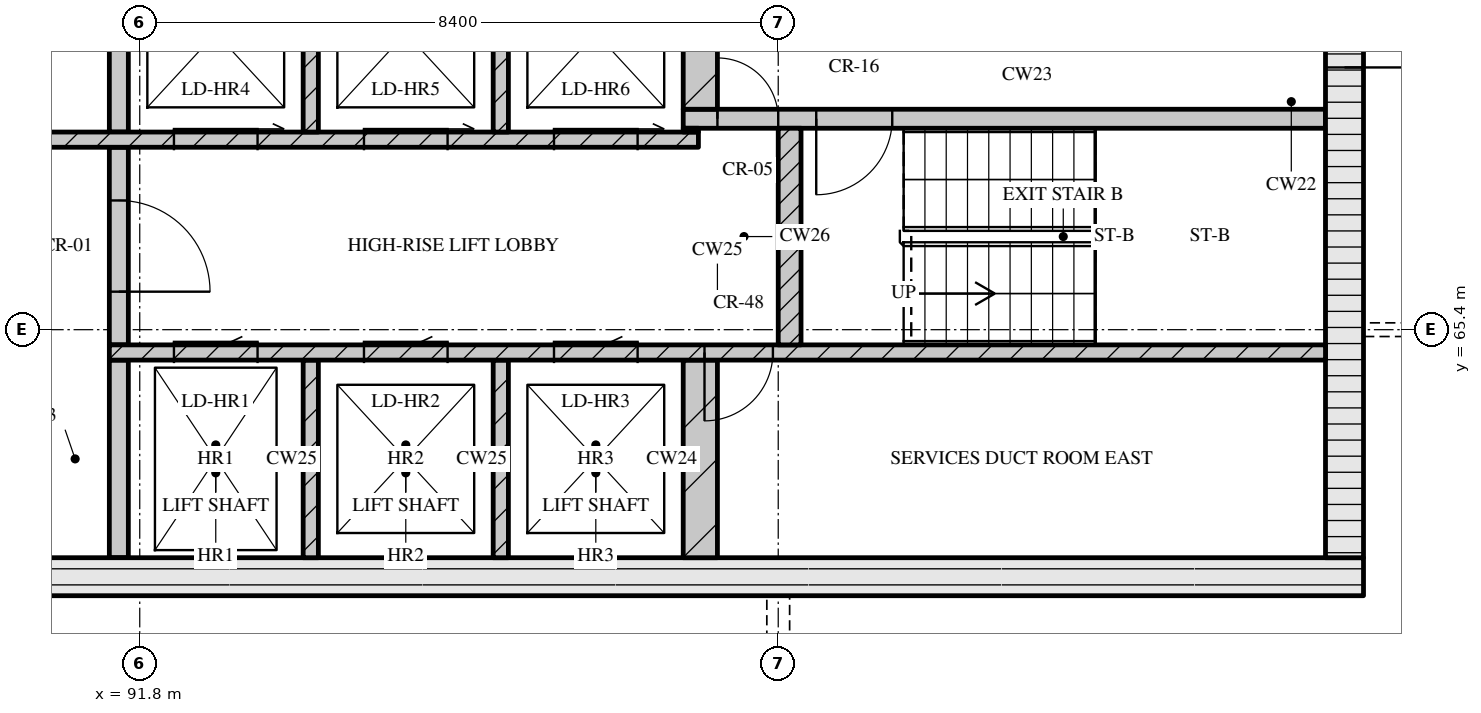
"""IFC4 building model, lengths in metres.
Left out: names, types, materials, properties, quantities, classifications, styles, units other than length and angle.
Written with IfcOpenShell. Run it as: python <this file> out.ifc"""

import sys

from ifc_helpers import new_model, si_unit, direction, frame, frame_2d, origin, place, context, subcontext, project, spatial, rectangle, extrude, element, fill, save


model = new_model("IFC4")
c1 = context("Model", 3, precision=1e-05, world=origin(), true_north=direction((0.0, 1.0)))
c2 = subcontext(c1, "Body", "Model", "MODEL_VIEW")
j1 = project(units=[si_unit("LENGTHUNIT", "METRE"), si_unit("PLANEANGLEUNIT", "RADIAN")], contexts=[c1])
p1 = place(None, origin())
s1 = spatial("IfcSite", under=j1, at=p1, CompositionType="ELEMENT")
p2 = place(p1, origin())
s2 = spatial("IfcBuilding", under=s1, at=p2, CompositionType="ELEMENT")
p3 = place(p2, frame((0.0, 0.0, 306.75)))
s3 = spatial("IfcBuildingStorey", under=s2, at=p3, CompositionType="ELEMENT", Elevation=306.75)
p4 = place(p3, frame((67.3, 62.15, 0.0), z_axis=(0.0, 0.0, 1.0), x_axis=(1.0, 0.0, 0.0)))
e1 = element("IfcWall", 1, at=p4, inside=s3, PredefinedType="SOLIDWALL", context=c2, shape_type="SweptSolid", body=[
    extrude(rectangle(XDim=40.6, YDim=0.5, at=frame_2d((20.3, 0.0))), origin(), (0.0, 0.0, 1.0), 3.3),
])
p5 = place(p4, frame((20.65, 0.0, 0.0)))
e2 = element("IfcOpeningElement", 2, at=p5, cuts=e1, PredefinedType="OPENING", context=c2, shape_type="SweptSolid", body=[
    extrude(rectangle(XDim=1.8, YDim=2.1, at=frame_2d((0.9, 1.05))), frame((0.0, 0.26, 0.0), z_axis=(0.0, -1.0, 0.0), x_axis=(1.0, 0.0, 0.0)), (0.0, 0.0, 1.0), 0.52),
])
p6 = place(p3, frame((107.65, 62.4, 0.0), z_axis=(0.0, 0.0, 1.0), x_axis=(0.0, 1.0, 0.0)))
e3 = element("IfcWall", 3, at=p6, inside=s3, PredefinedType="SOLIDWALL", context=c2, shape_type="SweptSolid", body=[
    extrude(rectangle(XDim=12.0, YDim=0.5, at=frame_2d((6.0, 0.0))), origin(), (0.0, 0.0, 1.0), 3.3),
])
p7 = place(p6, frame((6.45, 0.0, 0.0)))
e4 = element("IfcOpeningElement", 4, at=p7, cuts=e3, PredefinedType="OPENING", context=c2, shape_type="SweptSolid", body=[
    extrude(rectangle(XDim=1.2, YDim=2.1, at=frame_2d((0.6, 1.05))), frame((0.0, 0.26, 0.0), z_axis=(0.0, -1.0, 0.0), x_axis=(1.0, 0.0, 0.0)), (0.0, 0.0, 1.0), 0.52),
])
p8 = place(p3, frame((91.525, 62.4, 0.0), z_axis=(0.0, 0.0, 1.0), x_axis=(0.0, 1.0, 0.0)))
e5 = element("IfcWall", 5, at=p8, inside=s3, PredefinedType="SOLIDWALL", context=c2, shape_type="SweptSolid", body=[
    extrude(rectangle(XDim=2.6, YDim=0.25, at=frame_2d((1.3, 0.0))), origin(), (0.0, 0.0, 1.0), 3.3),
])
for number, where, z_axis, x_axis in (
    (6, (94.05, 62.4, 0.0), (0.0, 0.0, 1.0), (0.0, 1.0, 0.0)),
    (7, (96.55, 62.4, 0.0), (0.0, 0.0, 1.0), (0.0, 1.0, 0.0)),
):
    element("IfcWall", number, at=place(p3, frame(where, z_axis=z_axis, x_axis=x_axis)), inside=s3, PredefinedType="SOLIDWALL", context=c2, shape_type="SweptSolid", body=[
        extrude(rectangle(XDim=2.6, YDim=0.2, at=frame_2d((1.3, 0.0))), origin(), (0.0, 0.0, 1.0), 3.3),
    ])
p9 = place(p3, frame((99.175, 62.4, 0.0), z_axis=(0.0, 0.0, 1.0), x_axis=(0.0, 1.0, 0.0)))
e8 = element("IfcWall", 8, at=p9, inside=s3, PredefinedType="SOLIDWALL", context=c2, shape_type="SweptSolid", body=[
    extrude(rectangle(XDim=2.6, YDim=0.45, at=frame_2d((1.3, 0.0))), origin(), (0.0, 0.0, 1.0), 3.3),
])
p10 = place(p3, frame((91.4, 65.1, 0.0), z_axis=(0.0, 0.0, 1.0), x_axis=(1.0, 0.0, 0.0)))
e9 = element("IfcWall", 9, at=p10, inside=s3, PredefinedType="SOLIDWALL", context=c2, shape_type="SweptSolid", body=[
    extrude(rectangle(XDim=16.0, YDim=0.2, at=frame_2d((8.0, 0.0))), origin(), (0.0, 0.0, 1.0), 3.3),
])
p11 = place(p10, frame((0.85, 0.0, 0.0)))
e10 = element("IfcOpeningElement", 10, at=p11, cuts=e9, PredefinedType="OPENING", context=c2, shape_type="SweptSolid", body=[
    extrude(rectangle(XDim=1.1, YDim=2.1, at=frame_2d((0.55, 1.05))), frame((0.0, 0.11, 0.0), z_axis=(0.0, -1.0, 0.0), x_axis=(1.0, 0.0, 0.0)), (0.0, 0.0, 1.0), 0.22),
])
p12 = place(p10, frame((3.35, 0.0, 0.0)))
e11 = element("IfcOpeningElement", 11, at=p12, cuts=e9, PredefinedType="OPENING", context=c2, shape_type="SweptSolid", body=[
    extrude(rectangle(XDim=1.1, YDim=2.1, at=frame_2d((0.55, 1.05))), frame((0.0, 0.11, 0.0), z_axis=(0.0, -1.0, 0.0), x_axis=(1.0, 0.0, 0.0)), (0.0, 0.0, 1.0), 0.22),
])
p13 = place(p10, frame((5.85, 0.0, 0.0)))
e12 = element("IfcOpeningElement", 12, at=p13, cuts=e9, PredefinedType="OPENING", context=c2, shape_type="SweptSolid", body=[
    extrude(rectangle(XDim=1.1, YDim=2.1, at=frame_2d((0.55, 1.05))), frame((0.0, 0.11, 0.0), z_axis=(0.0, -1.0, 0.0), x_axis=(1.0, 0.0, 0.0)), (0.0, 0.0, 1.0), 0.22),
])
p14 = place(p10, frame((7.83, 0.0, 0.0)))
e13 = element("IfcOpeningElement", 13, at=p14, cuts=e9, PredefinedType="OPENING", context=c2, shape_type="SweptSolid", body=[
    extrude(rectangle(XDim=0.9, YDim=2.1, at=frame_2d((0.45, 1.05))), frame((0.0, 0.11, 0.0), z_axis=(0.0, -1.0, 0.0), x_axis=(1.0, 0.0, 0.0)), (0.0, 0.0, 1.0), 0.22),
])
p15 = place(p3, frame((91.525, 65.2, 0.0), z_axis=(0.0, 0.0, 1.0), x_axis=(0.0, 1.0, 0.0)))
e14 = element("IfcWall", 14, at=p15, inside=s3, PredefinedType="SOLIDWALL", context=c2, shape_type="SweptSolid", body=[
    extrude(rectangle(XDim=2.6, YDim=0.25, at=frame_2d((1.3, 0.0))), origin(), (0.0, 0.0, 1.0), 3.3),
])
p16 = place(p15, frame((0.7, 0.0, 0.0)))
e15 = element("IfcOpeningElement", 15, at=p16, cuts=e14, PredefinedType="OPENING", context=c2, shape_type="SweptSolid", body=[
    extrude(rectangle(XDim=1.2, YDim=2.1, at=frame_2d((0.6, 1.05))), frame((0.0, 0.135, 0.0), z_axis=(0.0, -1.0, 0.0), x_axis=(1.0, 0.0, 0.0)), (0.0, 0.0, 1.0), 0.27),
])
p17 = place(p3, frame((100.35, 65.2, 0.0), z_axis=(0.0, 0.0, 1.0), x_axis=(0.0, 1.0, 0.0)))
e16 = element("IfcWall", 16, at=p17, inside=s3, PredefinedType="SOLIDWALL", context=c2, shape_type="SweptSolid", body=[
    extrude(rectangle(XDim=2.85, YDim=0.3, at=frame_2d((1.425, 0.0))), origin(), (0.0, 0.0, 1.0), 3.3),
])
p18 = place(p3, frame((76.05, 67.9, 0.0), z_axis=(0.0, 0.0, 1.0), x_axis=(1.0, 0.0, 0.0)))
e17 = element("IfcWall", 17, at=p18, inside=s3, PredefinedType="SOLIDWALL", context=c2, shape_type="SweptSolid", body=[
    extrude(rectangle(XDim=23.1, YDim=0.2, at=frame_2d((11.55, 0.0))), origin(), (0.0, 0.0, 1.0), 3.3),
])
p19 = place(p18, frame((1.4, 0.0, 0.0)))
e18 = element("IfcOpeningElement", 18, at=p19, cuts=e17, PredefinedType="OPENING", context=c2, shape_type="SweptSolid", body=[
    extrude(rectangle(XDim=0.9, YDim=2.1, at=frame_2d((0.45, 1.05))), frame((0.0, 0.11, 0.0), z_axis=(0.0, -1.0, 0.0), x_axis=(1.0, 0.0, 0.0)), (0.0, 0.0, 1.0), 0.22),
])
p20 = place(p18, frame((5.11, 0.0, 0.0)))
e19 = element("IfcOpeningElement", 19, at=p20, cuts=e17, PredefinedType="OPENING", context=c2, shape_type="SweptSolid", body=[
    extrude(rectangle(XDim=0.9, YDim=2.1, at=frame_2d((0.45, 1.05))), frame((0.0, 0.11, 0.0), z_axis=(0.0, -1.0, 0.0), x_axis=(1.0, 0.0, 0.0)), (0.0, 0.0, 1.0), 0.22),
])
p21 = place(p18, frame((8.45, 0.0, 0.0)))
e20 = element("IfcOpeningElement", 20, at=p21, cuts=e17, PredefinedType="OPENING", context=c2, shape_type="SweptSolid", body=[
    extrude(rectangle(XDim=0.9, YDim=2.1, at=frame_2d((0.45, 1.05))), frame((0.0, 0.11, 0.0), z_axis=(0.0, -1.0, 0.0), x_axis=(1.0, 0.0, 0.0)), (0.0, 0.0, 1.0), 0.22),
])
p22 = place(p18, frame((10.91, 0.0, 0.0)))
e21 = element("IfcOpeningElement", 21, at=p22, cuts=e17, PredefinedType="OPENING", context=c2, shape_type="SweptSolid", body=[
    extrude(rectangle(XDim=0.9, YDim=2.1, at=frame_2d((0.45, 1.05))), frame((0.0, 0.11, 0.0), z_axis=(0.0, -1.0, 0.0), x_axis=(1.0, 0.0, 0.0)), (0.0, 0.0, 1.0), 0.22),
])
p23 = place(p18, frame((13.55, 0.0, 0.0)))
e22 = element("IfcOpeningElement", 22, at=p23, cuts=e17, PredefinedType="OPENING", context=c2, shape_type="SweptSolid", body=[
    extrude(rectangle(XDim=1.0, YDim=2.1, at=frame_2d((0.5, 1.05))), frame((0.0, 0.11, 0.0), z_axis=(0.0, -1.0, 0.0), x_axis=(1.0, 0.0, 0.0)), (0.0, 0.0, 1.0), 0.22),
])
p24 = place(p18, frame((16.2, 0.0, 0.0)))
e23 = element("IfcOpeningElement", 23, at=p24, cuts=e17, PredefinedType="OPENING", context=c2, shape_type="SweptSolid", body=[
    extrude(rectangle(XDim=1.1, YDim=2.1, at=frame_2d((0.55, 1.05))), frame((0.0, 0.11, 0.0), z_axis=(0.0, -1.0, 0.0), x_axis=(1.0, 0.0, 0.0)), (0.0, 0.0, 1.0), 0.22),
])
p25 = place(p18, frame((18.7, 0.0, 0.0)))
e24 = element("IfcOpeningElement", 24, at=p25, cuts=e17, PredefinedType="OPENING", context=c2, shape_type="SweptSolid", body=[
    extrude(rectangle(XDim=1.1, YDim=2.1, at=frame_2d((0.55, 1.05))), frame((0.0, 0.11, 0.0), z_axis=(0.0, -1.0, 0.0), x_axis=(1.0, 0.0, 0.0)), (0.0, 0.0, 1.0), 0.22),
])
p26 = place(p18, frame((21.2, 0.0, 0.0)))
e25 = element("IfcOpeningElement", 25, at=p26, cuts=e17, PredefinedType="OPENING", context=c2, shape_type="SweptSolid", body=[
    extrude(rectangle(XDim=1.1, YDim=2.1, at=frame_2d((0.55, 1.05))), frame((0.0, 0.11, 0.0), z_axis=(0.0, -1.0, 0.0), x_axis=(1.0, 0.0, 0.0)), (0.0, 0.0, 1.0), 0.22),
])
p27 = place(p3, frame((91.525, 68.0, 0.0), z_axis=(0.0, 0.0, 1.0), x_axis=(0.0, 1.0, 0.0)))
e26 = element("IfcWall", 26, at=p27, inside=s3, PredefinedType="SOLIDWALL", context=c2, shape_type="SweptSolid", body=[
    extrude(rectangle(XDim=2.6, YDim=0.25, at=frame_2d((1.3, 0.0))), origin(), (0.0, 0.0, 1.0), 3.3),
])
for number, where, z_axis, x_axis in (
    (27, (94.05, 68.0, 0.0), (0.0, 0.0, 1.0), (0.0, 1.0, 0.0)),
    (28, (96.55, 68.0, 0.0), (0.0, 0.0, 1.0), (0.0, 1.0, 0.0)),
):
    element("IfcWall", number, at=place(p3, frame(where, z_axis=z_axis, x_axis=x_axis)), inside=s3, PredefinedType="SOLIDWALL", context=c2, shape_type="SweptSolid", body=[
        extrude(rectangle(XDim=2.6, YDim=0.2, at=frame_2d((1.3, 0.0))), origin(), (0.0, 0.0, 1.0), 3.3),
    ])
p28 = place(p3, frame((98.95, 68.025, 0.0), z_axis=(0.0, 0.0, 1.0), x_axis=(1.0, 0.0, 0.0)))
e29 = element("IfcWall", 29, at=p28, inside=s3, PredefinedType="SOLIDWALL", context=c2, shape_type="SweptSolid", body=[
    extrude(rectangle(XDim=0.2, YDim=0.05, at=frame_2d((0.1, 0.0))), origin(), (0.0, 0.0, 1.0), 3.3),
])
p29 = place(p3, frame((98.95, 68.175, 0.0), z_axis=(0.0, 0.0, 1.0), x_axis=(1.0, 0.0, 0.0)))
e30 = element("IfcWall", 30, at=p29, inside=s3, PredefinedType="SOLIDWALL", context=c2, shape_type="SweptSolid", body=[
    extrude(rectangle(XDim=8.45, YDim=0.25, at=frame_2d((4.225, 0.0))), origin(), (0.0, 0.0, 1.0), 3.3),
])
p30 = place(p29, frame((0.45, 0.0, 0.0)))
e31 = element("IfcOpeningElement", 31, at=p30, cuts=e30, PredefinedType="OPENING", context=c2, shape_type="SweptSolid", body=[
    extrude(rectangle(XDim=0.8, YDim=2.1, at=frame_2d((0.4, 1.05))), frame((0.0, 0.135, 0.0), z_axis=(0.0, -1.0, 0.0), x_axis=(1.0, 0.0, 0.0)), (0.0, 0.0, 1.0), 0.27),
])
p31 = place(p29, frame((1.75, 0.0, 0.0)))
e32 = element("IfcOpeningElement", 32, at=p31, cuts=e30, PredefinedType="OPENING", context=c2, shape_type="SweptSolid", body=[
    extrude(rectangle(XDim=1.0, YDim=2.1, at=frame_2d((0.5, 1.05))), frame((0.0, 0.135, 0.0), z_axis=(0.0, -1.0, 0.0), x_axis=(1.0, 0.0, 0.0)), (0.0, 0.0, 1.0), 0.27),
])
p32 = place(p3, frame((99.175, 68.3, 0.0), z_axis=(0.0, 0.0, 1.0), x_axis=(0.0, 1.0, 0.0)))
e33 = element("IfcWall", 33, at=p32, inside=s3, PredefinedType="SOLIDWALL", context=c2, shape_type="SweptSolid", body=[
    extrude(rectangle(XDim=2.3, YDim=0.45, at=frame_2d((1.15, 0.0))), origin(), (0.0, 0.0, 1.0), 3.3),
])
p33 = place(p11, origin())
e34 = element("IfcDoor", 34, at=p33, inside=s3, OperationType="SLIDING_TO_LEFT", PredefinedType="DOOR", context=c2, shape_type="SweptSolid", body=[
    extrude(rectangle(XDim=1.1, YDim=2.1, at=frame_2d((0.55, 1.05))), frame((0.0, 0.025, 0.0), z_axis=(0.0, -1.0, 0.0), x_axis=(1.0, 0.0, 0.0)), (0.0, 0.0, 1.0), 0.05),
])
fill(e10, e34)
p34 = place(p12, origin())
e35 = element("IfcDoor", 35, at=p34, inside=s3, OperationType="SLIDING_TO_LEFT", PredefinedType="DOOR", context=c2, shape_type="SweptSolid", body=[
    extrude(rectangle(XDim=1.1, YDim=2.1, at=frame_2d((0.55, 1.05))), frame((0.0, 0.025, 0.0), z_axis=(0.0, -1.0, 0.0), x_axis=(1.0, 0.0, 0.0)), (0.0, 0.0, 1.0), 0.05),
])
fill(e11, e35)
p35 = place(p13, origin())
e36 = element("IfcDoor", 36, at=p35, inside=s3, OperationType="SLIDING_TO_LEFT", PredefinedType="DOOR", context=c2, shape_type="SweptSolid", body=[
    extrude(rectangle(XDim=1.1, YDim=2.1, at=frame_2d((0.55, 1.05))), frame((0.0, 0.025, 0.0), z_axis=(0.0, -1.0, 0.0), x_axis=(1.0, 0.0, 0.0)), (0.0, 0.0, 1.0), 0.05),
])
fill(e12, e36)
p36 = place(p14, origin())
e37 = element("IfcDoor", 37, at=p36, inside=s3, OperationType="SINGLE_SWING_RIGHT", PredefinedType="DOOR", context=c2, shape_type="SweptSolid", body=[
    extrude(rectangle(XDim=0.9, YDim=2.1, at=frame_2d((0.45, 1.05))), frame((0.0, 0.025, 0.0), z_axis=(0.0, -1.0, 0.0), x_axis=(1.0, 0.0, 0.0)), (0.0, 0.0, 1.0), 0.05),
])
fill(e13, e37)
p37 = place(p16, origin())
e38 = element("IfcDoor", 38, at=p37, inside=s3, OperationType="SINGLE_SWING_RIGHT", PredefinedType="DOOR", context=c2, shape_type="SweptSolid", body=[
    extrude(rectangle(XDim=1.2, YDim=2.1, at=frame_2d((0.6, 1.05))), frame((0.0, 0.025, 0.0), z_axis=(0.0, -1.0, 0.0), x_axis=(1.0, 0.0, 0.0)), (0.0, 0.0, 1.0), 0.05),
])
fill(e15, e38)
p38 = place(p24, origin())
e39 = element("IfcDoor", 39, at=p38, inside=s3, OperationType="SLIDING_TO_RIGHT", PredefinedType="DOOR", context=c2, shape_type="SweptSolid", body=[
    extrude(rectangle(XDim=1.1, YDim=2.1, at=frame_2d((0.55, 1.05))), frame((0.0, 0.025, 0.0), z_axis=(0.0, -1.0, 0.0), x_axis=(1.0, 0.0, 0.0)), (0.0, 0.0, 1.0), 0.05),
])
fill(e23, e39)
p39 = place(p25, origin())
e40 = element("IfcDoor", 40, at=p39, inside=s3, OperationType="SLIDING_TO_RIGHT", PredefinedType="DOOR", context=c2, shape_type="SweptSolid", body=[
    extrude(rectangle(XDim=1.1, YDim=2.1, at=frame_2d((0.55, 1.05))), frame((0.0, 0.025, 0.0), z_axis=(0.0, -1.0, 0.0), x_axis=(1.0, 0.0, 0.0)), (0.0, 0.0, 1.0), 0.05),
])
fill(e24, e40)
p40 = place(p26, origin())
e41 = element("IfcDoor", 41, at=p40, inside=s3, OperationType="SLIDING_TO_RIGHT", PredefinedType="DOOR", context=c2, shape_type="SweptSolid", body=[
    extrude(rectangle(XDim=1.1, YDim=2.1, at=frame_2d((0.55, 1.05))), frame((0.0, 0.025, 0.0), z_axis=(0.0, -1.0, 0.0), x_axis=(1.0, 0.0, 0.0)), (0.0, 0.0, 1.0), 0.05),
])
fill(e25, e41)
p41 = place(p30, origin())
e42 = element("IfcDoor", 42, at=p41, inside=s3, OperationType="SINGLE_SWING_LEFT", PredefinedType="DOOR", context=c2, shape_type="SweptSolid", body=[
    extrude(rectangle(XDim=0.8, YDim=2.1, at=frame_2d((0.4, 1.05))), frame((0.0, 0.025, 0.0), z_axis=(0.0, -1.0, 0.0), x_axis=(1.0, 0.0, 0.0)), (0.0, 0.0, 1.0), 0.05),
])
fill(e31, e42)
p42 = place(p31, origin())
e43 = element("IfcDoor", 43, at=p42, inside=s3, OperationType="SINGLE_SWING_RIGHT", PredefinedType="DOOR", context=c2, shape_type="SweptSolid", body=[
    extrude(rectangle(XDim=1.0, YDim=2.1, at=frame_2d((0.5, 1.05))), frame((0.0, 0.025, 0.0), z_axis=(0.0, -1.0, 0.0), x_axis=(1.0, 0.0, 0.0)), (0.0, 0.0, 1.0), 0.05),
])
fill(e32, e43)
p43 = place(p7, origin())
e44 = element("IfcDoor", 44, at=p43, inside=s3, OperationType="SINGLE_SWING_RIGHT", PredefinedType="DOOR", context=c2, shape_type="SweptSolid", body=[
    extrude(rectangle(XDim=1.2, YDim=2.1, at=frame_2d((0.6, 1.05))), frame((0.0, 0.025, 0.0), z_axis=(0.0, -1.0, 0.0), x_axis=(1.0, 0.0, 0.0)), (0.0, 0.0, 1.0), 0.05),
])
fill(e4, e44)
save(model, sys.argv[1])
